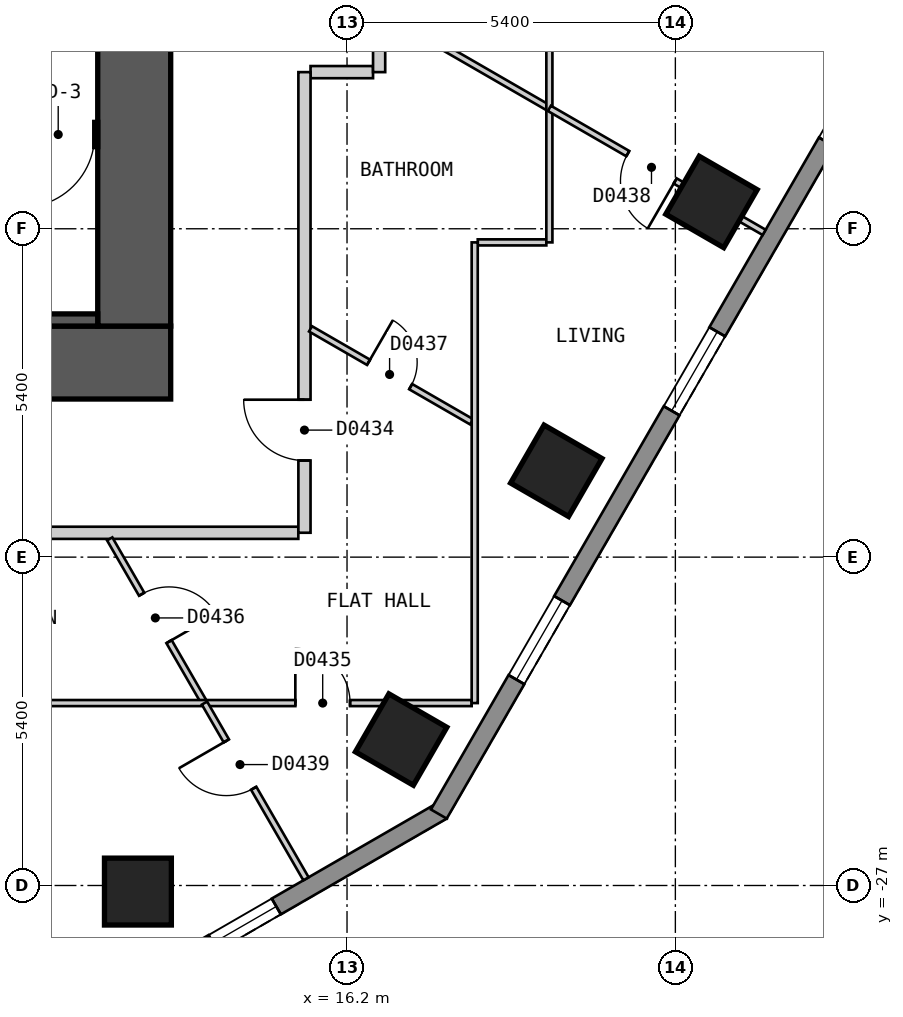
"""IFC4 building model, lengths in metres.
Left out: names, types, materials, properties, quantities, classifications, styles, units other than length and angle.
Written with IfcOpenShell. Run it as: python <this file> out.ifc"""

import sys

from ifc_helpers import new_model, si_unit, direction, frame, frame_2d, origin, origin_2d, place, context, subcontext, project, spatial, polyline, rectangle, outline, extrude, element, fill, save


model = new_model("IFC4")
c1 = context("Model", 3, precision=1e-05, world=origin(), true_north=direction((0.0, 1.0)))
c2 = subcontext(c1, "Body", "Model", "MODEL_VIEW")
j1 = project(units=[si_unit("LENGTHUNIT", "METRE"), si_unit("PLANEANGLEUNIT", "RADIAN")], contexts=[c1])
p1 = place(None, origin())
s1 = spatial("IfcSite", under=j1, at=p1, CompositionType="ELEMENT")
p2 = place(p1, origin())
s2 = spatial("IfcBuilding", under=s1, at=p2, CompositionType="ELEMENT")
p3 = place(p2, frame((0.0, 0.0, 26.4)))
s3 = spatial("IfcBuildingStorey", under=s2, at=p3, CompositionType="ELEMENT", Elevation=26.4)
for number, where, z_axis, x_axis in (
    (1, (12.761, -27.1, 0.0), (0.0, 0.0, 1.0), (1.0, 0.0, 0.0)),
    (2, (17.09, -24.6, 0.0), (0.0, 0.0, 1.0), (0.5, 0.866, 0.0)),
    (3, (19.642, -20.18, 0.0), (0.0, 0.0, 1.0), (0.5, 0.866, 0.0)),
    (4, (22.194, -15.759, 0.0), (0.0, 0.0, 1.0), (0.5, 0.866, 0.0)),
):
    element("IfcColumn", number, at=place(p3, frame(where, z_axis=z_axis, x_axis=x_axis)), inside=s3, PredefinedType="COLUMN", context=c2, shape_type="SweptSolid", body=[
        extrude(rectangle(XDim=1.1, YDim=1.1, at=origin_2d()), origin(), (0.0, 0.0, 1.0), 3.0),
    ])
p4 = place(p3, frame((-13.3, -18.4, 0.0), z_axis=(0.0, 0.0, 1.0), x_axis=(1.0, 0.0, 0.0)))
e5 = element("IfcWall", 5, at=p4, inside=s3, PredefinedType="SHEAR", context=c2, shape_type="SweptSolid", body=[
    extrude(rectangle(XDim=26.6, YDim=1.2, at=frame_2d((13.3, 0.0))), origin(), (0.0, 0.0, 1.0), 2.7),
])
p5 = place(p3, frame((12.7, -17.8, 0.0), z_axis=(0.0, 0.0, 1.0), x_axis=(0.0, 1.0, 0.0)))
e6 = element("IfcWall", 6, at=p5, inside=s3, PredefinedType="SHEAR", context=c2, shape_type="SweptSolid", body=[
    extrude(rectangle(XDim=11.6, YDim=1.2, at=frame_2d((5.8, 0.0))), origin(), (0.0, 0.0, 1.0), 2.7),
])
p6 = place(p3, frame((-12.1, -14.65, 0.0), z_axis=(0.0, 0.0, 1.0), x_axis=(1.0, 0.0, 0.0)))
e7 = element("IfcWall", 7, at=p6, inside=s3, PredefinedType="SHEAR", context=c2, shape_type="SweptSolid", body=[
    extrude(rectangle(XDim=24.2, YDim=0.4, at=frame_2d((12.1, 0.0))), origin(), (0.0, 0.0, 1.0), 2.7),
])
p7 = place(p6, frame((1.3, 0.0, 0.0), z_axis=(0.0, 0.0, 1.0), x_axis=(-1.0, 0.0, 0.0)))
e8 = element("IfcOpeningElement", 8, at=p7, cuts=e7, PredefinedType="OPENING", context=c2, shape_type="SweptSolid", body=[
    extrude(rectangle(XDim=1.2, YDim=2.1, at=frame_2d((0.6, 1.05))), frame((0.0, 0.21, 0.0), z_axis=(0.0, -1.0, 0.0), x_axis=(1.0, 0.0, 0.0)), (0.0, 0.0, 1.0), 0.42),
])
p8 = place(p6, frame((24.15, 0.0, 0.0), z_axis=(0.0, 0.0, 1.0), x_axis=(-1.0, 0.0, 0.0)))
e9 = element("IfcOpeningElement", 9, at=p8, cuts=e7, PredefinedType="OPENING", context=c2, shape_type="SweptSolid", body=[
    extrude(rectangle(XDim=1.2, YDim=2.1, at=frame_2d((0.6, 1.05))), frame((0.0, 0.21, 0.0), z_axis=(0.0, -1.0, 0.0), x_axis=(1.0, 0.0, 0.0)), (0.0, 0.0, 1.0), 0.42),
])
p9 = place(p6, frame((16.25, 0.0, 0.0), z_axis=(0.0, 0.0, 1.0), x_axis=(-1.0, 0.0, 0.0)))
e10 = element("IfcOpeningElement", 10, at=p9, cuts=e7, PredefinedType="OPENING", context=c2, shape_type="SweptSolid", body=[
    extrude(rectangle(XDim=0.9, YDim=2.1, at=frame_2d((0.45, 1.05))), frame((0.0, 0.21, 0.0), z_axis=(0.0, -1.0, 0.0), x_axis=(1.0, 0.0, 0.0)), (0.0, 0.0, 1.0), 0.42),
])
p10 = place(p6, frame((18.05, 0.0, 0.0), z_axis=(0.0, 0.0, 1.0), x_axis=(-1.0, 0.0, 0.0)))
e11 = element("IfcOpeningElement", 11, at=p10, cuts=e7, PredefinedType="OPENING", context=c2, shape_type="SweptSolid", body=[
    extrude(rectangle(XDim=0.9, YDim=2.1, at=frame_2d((0.45, 1.05))), frame((0.0, 0.21, 0.0), z_axis=(0.0, -1.0, 0.0), x_axis=(1.0, 0.0, 0.0)), (0.0, 0.0, 1.0), 0.42),
])
p11 = place(p3, frame((13.435, -28.27, 0.0), z_axis=(0.0, 0.0, 1.0), x_axis=(0.866010750942, 0.50002537861, 0.0)))
e12 = element("IfcWall", 12, at=p11, inside=s3, PredefinedType="SOLIDWALL", context=c2, shape_type="SweptSolid", body=[
    extrude(outline(polyline([(0.0, -0.15), (5.0, -0.15), (4.919, 0.15), (0.08, 0.15), (0.0, -0.15)])), origin(), (0.0, 0.0, 1.0), 2.7),
])
p12 = place(p11, frame((0.65, 0.0, 0.15)))
e13 = element("IfcOpeningElement", 13, at=p12, cuts=e12, PredefinedType="OPENING", context=c2, shape_type="SweptSolid", body=[
    extrude(rectangle(XDim=1.2, YDim=2.1, at=frame_2d((0.6, 1.05))), frame((0.0, 0.16, 0.0), z_axis=(0.0, -1.0, 0.0), x_axis=(1.0, 0.0, 0.0)), (0.0, 0.0, 1.0), 0.32),
])
p13 = place(p3, frame((17.71, -25.825, 0.0), z_axis=(0.0, 0.0, 1.0), x_axis=(0.500001938803, 0.866024284413, 0.0)))
e14 = element("IfcWall", 14, at=p13, inside=s3, PredefinedType="SOLIDWALL", context=c2, shape_type="SweptSolid", body=[
    extrude(outline(polyline([(0.0, -0.15), (27.02, -0.15), (26.94, 0.15), (0.08, 0.15), (0.0, -0.15)])), origin(), (0.0, 0.0, 1.0), 2.7),
])
p14 = place(p13, frame((2.553, 0.0, 0.15)))
e15 = element("IfcOpeningElement", 15, at=p14, cuts=e14, PredefinedType="OPENING", context=c2, shape_type="SweptSolid", body=[
    extrude(rectangle(XDim=1.5, YDim=2.1, at=frame_2d((0.75, 1.05))), frame((0.0, 0.16, 0.0), z_axis=(0.0, -1.0, 0.0), x_axis=(1.0, 0.0, 0.0)), (0.0, 0.0, 1.0), 0.32),
])
p15 = place(p13, frame((7.658, 0.0, 0.15)))
e16 = element("IfcOpeningElement", 16, at=p15, cuts=e14, PredefinedType="OPENING", context=c2, shape_type="SweptSolid", body=[
    extrude(rectangle(XDim=1.5, YDim=2.1, at=frame_2d((0.75, 1.05))), frame((0.0, 0.16, 0.0), z_axis=(0.0, -1.0, 0.0), x_axis=(1.0, 0.0, 0.0)), (0.0, 0.0, 1.0), 0.32),
])
p16 = place(p13, frame((12.761, 0.0, 0.15)))
e17 = element("IfcOpeningElement", 17, at=p16, cuts=e14, PredefinedType="OPENING", context=c2, shape_type="SweptSolid", body=[
    extrude(rectangle(XDim=1.5, YDim=2.1, at=frame_2d((0.75, 1.05))), frame((0.0, 0.16, 0.0), z_axis=(0.0, -1.0, 0.0), x_axis=(1.0, 0.0, 0.0)), (0.0, 0.0, 1.0), 0.32),
])
p17 = place(p13, frame((17.865, 0.0, 0.15)))
e18 = element("IfcOpeningElement", 18, at=p17, cuts=e14, PredefinedType="OPENING", context=c2, shape_type="SweptSolid", body=[
    extrude(rectangle(XDim=1.5, YDim=2.1, at=frame_2d((0.75, 1.05))), frame((0.0, 0.16, 0.0), z_axis=(0.0, -1.0, 0.0), x_axis=(1.0, 0.0, 0.0)), (0.0, 0.0, 1.0), 0.32),
])
p18 = place(p13, frame((22.969, 0.0, 0.15)))
e19 = element("IfcOpeningElement", 19, at=p18, cuts=e14, PredefinedType="OPENING", context=c2, shape_type="SweptSolid", body=[
    extrude(rectangle(XDim=1.5, YDim=2.1, at=frame_2d((0.75, 1.05))), frame((0.0, 0.16, 0.0), z_axis=(0.0, -1.0, 0.0), x_axis=(1.0, 0.0, 0.0)), (0.0, 0.0, 1.0), 0.32),
])
p19 = place(p3, frame((15.6, -13.624, 0.0), z_axis=(0.0, 0.0, 1.0), x_axis=(1.0, 0.0, 0.0)))
e20 = element("IfcWall", 20, at=p19, inside=s3, PredefinedType="PARTITIONING", context=c2, shape_type="SweptSolid", body=[
    extrude(rectangle(XDim=1.028, YDim=0.2, at=frame_2d((0.514, 0.0))), origin(), (0.0, 0.0, 1.0), 2.7),
])
p20 = place(p3, frame((-15.499, -21.2, 0.0), z_axis=(0.0, 0.0, 1.0), x_axis=(1.0, 0.0, 0.0)))
e21 = element("IfcWall", 21, at=p20, inside=s3, PredefinedType="PARTITIONING", context=c2, shape_type="SweptSolid", body=[
    extrude(rectangle(XDim=30.898, YDim=0.2, at=frame_2d((15.449, 0.0))), origin(), (0.0, 0.0, 1.0), 2.7),
])
p21 = place(p20, frame((15.0, 0.0, 0.0)))
e22 = element("IfcOpeningElement", 22, at=p21, cuts=e21, PredefinedType="OPENING", context=c2, shape_type="SweptSolid", body=[
    extrude(rectangle(XDim=1.0, YDim=2.1, at=frame_2d((0.5, 1.05))), frame((0.0, 0.11, 0.0), z_axis=(0.0, -1.0, 0.0), x_axis=(1.0, 0.0, 0.0)), (0.0, 0.0, 1.0), 0.22),
])
p22 = place(p20, frame((20.104, 0.0, 0.0)))
e23 = element("IfcOpeningElement", 23, at=p22, cuts=e21, PredefinedType="OPENING", context=c2, shape_type="SweptSolid", body=[
    extrude(rectangle(XDim=1.0, YDim=2.1, at=frame_2d((0.5, 1.05))), frame((0.0, 0.11, 0.0), z_axis=(0.0, -1.0, 0.0), x_axis=(1.0, 0.0, 0.0)), (0.0, 0.0, 1.0), 0.22),
])
p23 = place(p3, frame((15.5, -21.199, 0.0), z_axis=(0.0, 0.0, 1.0), x_axis=(0.0, 1.0, 0.0)))
e24 = element("IfcWall", 24, at=p23, inside=s3, PredefinedType="PARTITIONING", context=c2, shape_type="SweptSolid", body=[
    extrude(rectangle(XDim=7.575, YDim=0.2, at=frame_2d((3.788, 0.0))), origin(), (0.0, 0.0, 1.0), 2.7),
])
p24 = place(p23, frame((1.188, 0.0, 0.0)))
e25 = element("IfcOpeningElement", 25, at=p24, cuts=e24, PredefinedType="OPENING", context=c2, shape_type="SweptSolid", body=[
    extrude(rectangle(XDim=1.0, YDim=2.1, at=frame_2d((0.5, 1.05))), frame((0.0, 0.11, 0.0), z_axis=(0.0, -1.0, 0.0), x_axis=(1.0, 0.0, 0.0)), (0.0, 0.0, 1.0), 0.22),
])
p25 = place(p3, frame((16.728, -13.624, 0.0), z_axis=(0.0, 0.0, 1.0), x_axis=(0.0, 1.0, 0.0)))
e26 = element("IfcWall", 26, at=p25, inside=s3, PredefinedType="PARTITIONING", context=c2, shape_type="SweptSolid", body=[
    extrude(rectangle(XDim=4.83, YDim=0.2, at=frame_2d((2.415, 0.0))), origin(), (0.0, 0.0, 1.0), 2.7),
])
p26 = place(p3, frame((12.297, -21.3, 0.0), z_axis=(0.0, 0.0, 1.0), x_axis=(0.500004896655, -0.866022576681, 0.0)))
e27 = element("IfcWall", 27, at=p26, inside=s3, PredefinedType="PARTITIONING", context=c2, shape_type="SweptSolid", body=[
    extrude(rectangle(XDim=3.118, YDim=0.1, at=frame_2d((1.559, 0.0))), origin(), (0.0, 0.0, 1.0), 2.7),
])
p27 = place(p26, frame((1.051, 0.0, 0.0)))
e28 = element("IfcOpeningElement", 28, at=p27, cuts=e27, PredefinedType="OPENING", context=c2, shape_type="SweptSolid", body=[
    extrude(rectangle(XDim=0.9, YDim=2.1, at=frame_2d((0.45, 1.05))), frame((0.0, 0.06, 0.0), z_axis=(0.0, -1.0, 0.0), x_axis=(1.0, 0.0, 0.0)), (0.0, 0.0, 1.0), 0.12),
])
p28 = place(p3, frame((15.6, -17.846, 0.0), z_axis=(0.0, 0.0, 1.0), x_axis=(0.866148385016, -0.499786929736, 0.0)))
e29 = element("IfcWall", 29, at=p28, inside=s3, PredefinedType="PARTITIONING", context=c2, shape_type="SweptSolid", body=[
    extrude(rectangle(XDim=3.059, YDim=0.1, at=frame_2d((1.53, 0.0))), origin(), (0.0, 0.0, 1.0), 2.7),
])
p29 = place(p28, frame((1.101, 0.0, 0.0)))
e30 = element("IfcOpeningElement", 30, at=p29, cuts=e29, PredefinedType="OPENING", context=c2, shape_type="SweptSolid", body=[
    extrude(rectangle(XDim=0.8, YDim=2.1, at=frame_2d((0.4, 1.05))), frame((0.0, 0.06, 0.0), z_axis=(0.0, -1.0, 0.0), x_axis=(1.0, 0.0, 0.0)), (0.0, 0.0, 1.0), 0.12),
])
p30 = place(p3, frame((16.828, -12.661, 0.0), z_axis=(0.0, 0.0, 1.0), x_axis=(0.866008246423, -0.500029716244, 0.0)))
e31 = element("IfcWall", 31, at=p30, inside=s3, PredefinedType="PARTITIONING", context=c2, shape_type="SweptSolid", body=[
    extrude(rectangle(XDim=3.118, YDim=0.1, at=frame_2d((1.559, 0.0))), origin(), (0.0, 0.0, 1.0), 2.7),
])
p31 = place(p3, frame((18.35, -16.424, 0.0), z_axis=(0.0, 0.0, 1.0), x_axis=(1.0, 0.0, 0.0)))
e32 = element("IfcWall", 32, at=p31, inside=s3, PredefinedType="PARTITIONING", context=c2, shape_type="SweptSolid", body=[
    extrude(rectangle(XDim=1.128, YDim=0.1, at=frame_2d((0.564, 0.0))), origin(), (0.0, 0.0, 1.0), 2.7),
])
p32 = place(p3, frame((7.757, -24.0, 0.0), z_axis=(0.0, 0.0, 1.0), x_axis=(1.0, 0.0, 0.0)))
e33 = element("IfcWall", 33, at=p32, inside=s3, PredefinedType="PARTITIONING", context=c2, shape_type="SweptSolid", body=[
    extrude(rectangle(XDim=10.493, YDim=0.1, at=frame_2d((5.247, 0.0))), origin(), (0.0, 0.0, 1.0), 2.7),
])
p33 = place(p32, frame((7.593, 0.0, 0.0)))
e34 = element("IfcOpeningElement", 34, at=p33, cuts=e33, PredefinedType="OPENING", context=c2, shape_type="SweptSolid", body=[
    extrude(rectangle(XDim=0.9, YDim=2.1, at=frame_2d((0.45, 1.05))), frame((0.0, 0.06, 0.0), z_axis=(0.0, -1.0, 0.0), x_axis=(1.0, 0.0, 0.0)), (0.0, 0.0, 1.0), 0.12),
])
p34 = place(p3, frame((18.3, -24.0, 0.0), z_axis=(0.0, 0.0, 1.0), x_axis=(0.0, 1.0, 0.0)))
e35 = element("IfcWall", 35, at=p34, inside=s3, PredefinedType="PARTITIONING", context=c2, shape_type="SweptSolid", body=[
    extrude(rectangle(XDim=7.576, YDim=0.1, at=frame_2d((3.788, 0.0))), origin(), (0.0, 0.0, 1.0), 2.7),
])
p35 = place(p3, frame((19.528, -16.424, 0.0), z_axis=(0.0, 0.0, 1.0), x_axis=(0.0, 1.0, 0.0)))
e36 = element("IfcWall", 36, at=p35, inside=s3, PredefinedType="PARTITIONING", context=c2, shape_type="SweptSolid", body=[
    extrude(rectangle(XDim=7.982, YDim=0.1, at=frame_2d((3.991, 0.0))), origin(), (0.0, 0.0, 1.0), 2.7),
])
p36 = place(p35, frame((4.75, 0.0, 0.0)))
e37 = element("IfcOpeningElement", 37, at=p36, cuts=e36, PredefinedType="OPENING", context=c2, shape_type="SweptSolid", body=[
    extrude(rectangle(XDim=0.8, YDim=2.1, at=frame_2d((0.4, 1.05))), frame((0.0, 0.06, 0.0), z_axis=(0.0, -1.0, 0.0), x_axis=(1.0, 0.0, 0.0)), (0.0, 0.0, 1.0), 0.12),
])
p37 = place(p3, frame((13.856, -24.0, 0.0), z_axis=(0.0, 0.0, 1.0), x_axis=(0.50010451262, -0.865965054986, 0.0)))
e38 = element("IfcWall", 38, at=p37, inside=s3, PredefinedType="PARTITIONING", context=c2, shape_type="SweptSolid", body=[
    extrude(rectangle(XDim=3.337, YDim=0.1, at=frame_2d((1.668, 0.0))), origin(), (0.0, 0.0, 1.0), 2.7),
])
p38 = place(p37, frame((0.718, 0.0, 0.0)))
e39 = element("IfcOpeningElement", 39, at=p38, cuts=e38, PredefinedType="OPENING", context=c2, shape_type="SweptSolid", body=[
    extrude(rectangle(XDim=0.9, YDim=2.1, at=frame_2d((0.45, 1.05))), frame((0.0, 0.06, 0.0), z_axis=(0.0, -1.0, 0.0), x_axis=(1.0, 0.0, 0.0)), (0.0, 0.0, 1.0), 0.12),
])
p39 = place(p3, frame((19.528, -14.22, 0.0), z_axis=(0.0, 0.0, 1.0), x_axis=(0.866039047082, -0.499976368371, 0.0)))
e40 = element("IfcWall", 40, at=p39, inside=s3, PredefinedType="PARTITIONING", context=c2, shape_type="SweptSolid", body=[
    extrude(rectangle(XDim=4.078, YDim=0.1, at=frame_2d((2.039, 0.0))), origin(), (0.0, 0.0, 1.0), 2.7),
])
p40 = place(p39, frame((1.489, 0.0, 0.0)))
e41 = element("IfcOpeningElement", 41, at=p40, cuts=e40, PredefinedType="OPENING", context=c2, shape_type="SweptSolid", body=[
    extrude(rectangle(XDim=0.9, YDim=2.1, at=frame_2d((0.45, 1.05))), frame((0.0, 0.06, 0.0), z_axis=(0.0, -1.0, 0.0), x_axis=(1.0, 0.0, 0.0)), (0.0, 0.0, 1.0), 0.12),
])
p41 = place(p3, frame((6.7, -17.7, 0.0), z_axis=(0.0, 0.0, 1.0), x_axis=(1.0, 0.0, 0.0)))
e42 = element("IfcWall", 42, at=p41, inside=s3, PredefinedType="SOLIDWALL", context=c2, shape_type="SweptSolid", body=[
    extrude(rectangle(XDim=5.4, YDim=0.2, at=frame_2d((2.7, 0.0))), origin(), (0.0, 0.0, 1.0), 2.7),
])
p42 = place(p12, origin())
e43 = element("IfcWindow", 43, at=p42, inside=s3, PartitioningType="SINGLE_PANEL", PredefinedType="WINDOW", context=c2, shape_type="SweptSolid", body=[
    extrude(rectangle(XDim=1.2, YDim=2.1, at=frame_2d((0.6, 1.05))), frame((0.0, 0.03, 0.0), z_axis=(0.0, -1.0, 0.0), x_axis=(1.0, 0.0, 0.0)), (0.0, 0.0, 1.0), 0.06),
])
fill(e13, e43)
p43 = place(p14, origin())
e44 = element("IfcWindow", 44, at=p43, inside=s3, PartitioningType="SINGLE_PANEL", PredefinedType="WINDOW", context=c2, shape_type="SweptSolid", body=[
    extrude(rectangle(XDim=1.5, YDim=2.1, at=frame_2d((0.75, 1.05))), frame((0.0, 0.03, 0.0), z_axis=(0.0, -1.0, 0.0), x_axis=(1.0, 0.0, 0.0)), (0.0, 0.0, 1.0), 0.06),
])
fill(e15, e44)
p44 = place(p15, origin())
e45 = element("IfcWindow", 45, at=p44, inside=s3, PartitioningType="SINGLE_PANEL", PredefinedType="WINDOW", context=c2, shape_type="SweptSolid", body=[
    extrude(rectangle(XDim=1.5, YDim=2.1, at=frame_2d((0.75, 1.05))), frame((0.0, 0.03, 0.0), z_axis=(0.0, -1.0, 0.0), x_axis=(1.0, 0.0, 0.0)), (0.0, 0.0, 1.0), 0.06),
])
fill(e16, e45)
p45 = place(p24, origin())
e46 = element("IfcDoor", 46, at=p45, inside=s3, OperationType="SINGLE_SWING_RIGHT", PredefinedType="DOOR", context=c2, shape_type="SweptSolid", body=[
    extrude(rectangle(XDim=1.0, YDim=2.1, at=frame_2d((0.5, 1.05))), frame((0.0, 0.025, 0.0), z_axis=(0.0, -1.0, 0.0), x_axis=(1.0, 0.0, 0.0)), (0.0, 0.0, 1.0), 0.05),
])
fill(e25, e46)
p46 = place(p33, origin())
e47 = element("IfcDoor", 47, at=p46, inside=s3, OperationType="SINGLE_SWING_LEFT", PredefinedType="DOOR", context=c2, shape_type="SweptSolid", body=[
    extrude(rectangle(XDim=0.9, YDim=2.1, at=frame_2d((0.45, 1.05))), frame((0.0, 0.025, 0.0), z_axis=(0.0, -1.0, 0.0), x_axis=(1.0, 0.0, 0.0)), (0.0, 0.0, 1.0), 0.05),
])
fill(e34, e47)
p47 = place(p27, origin())
e48 = element("IfcDoor", 48, at=p47, inside=s3, OperationType="SINGLE_SWING_RIGHT", PredefinedType="DOOR", context=c2, shape_type="SweptSolid", body=[
    extrude(rectangle(XDim=0.9, YDim=2.1, at=frame_2d((0.45, 1.05))), frame((0.0, 0.025, 0.0), z_axis=(0.0, -1.0, 0.0), x_axis=(1.0, 0.0, 0.0)), (0.0, 0.0, 1.0), 0.05),
])
fill(e28, e48)
p48 = place(p29, origin())
e49 = element("IfcDoor", 49, at=p48, inside=s3, OperationType="SINGLE_SWING_LEFT", PredefinedType="DOOR", context=c2, shape_type="SweptSolid", body=[
    extrude(rectangle(XDim=0.8, YDim=2.1, at=frame_2d((0.4, 1.05))), frame((0.0, 0.025, 0.0), z_axis=(0.0, -1.0, 0.0), x_axis=(1.0, 0.0, 0.0)), (0.0, 0.0, 1.0), 0.05),
])
fill(e30, e49)
p49 = place(p40, origin())
e50 = element("IfcDoor", 50, at=p49, inside=s3, OperationType="SINGLE_SWING_RIGHT", PredefinedType="DOOR", context=c2, shape_type="SweptSolid", body=[
    extrude(rectangle(XDim=0.9, YDim=2.1, at=frame_2d((0.45, 1.05))), frame((0.0, 0.025, 0.0), z_axis=(0.0, -1.0, 0.0), x_axis=(1.0, 0.0, 0.0)), (0.0, 0.0, 1.0), 0.05),
])
fill(e41, e50)
p50 = place(p38, origin())
e51 = element("IfcDoor", 51, at=p50, inside=s3, OperationType="SINGLE_SWING_LEFT", PredefinedType="DOOR", context=c2, shape_type="SweptSolid", body=[
    extrude(rectangle(XDim=0.9, YDim=2.1, at=frame_2d((0.45, 1.05))), frame((0.0, 0.025, 0.0), z_axis=(0.0, -1.0, 0.0), x_axis=(1.0, 0.0, 0.0)), (0.0, 0.0, 1.0), 0.05),
])
fill(e39, e51)
p51 = place(p8, origin())
e52 = element("IfcDoor", 52, at=p51, inside=s3, OperationType="SINGLE_SWING_RIGHT", PredefinedType="DOOR", context=c2, shape_type="SweptSolid", body=[
    extrude(rectangle(XDim=1.2, YDim=2.1, at=frame_2d((0.6, 1.05))), frame((0.0, 0.025, 0.0), z_axis=(0.0, -1.0, 0.0), x_axis=(1.0, 0.0, 0.0)), (0.0, 0.0, 1.0), 0.05),
])
fill(e9, e52)
save(model, sys.argv[1])
